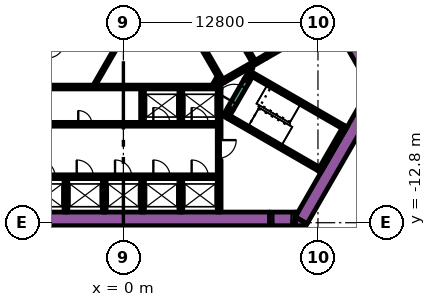
"""IFC4 building model, lengths in metres.
Left out: names, types, materials, properties, quantities, classifications, styles, units other than length and angle.
Written with IfcOpenShell. Run it as: python <this file> out.ifc"""

import sys

from ifc_helpers import new_model, si_unit, direction, frame, frame_2d, origin, place, context, subcontext, project, spatial, polyline, rectangle, outline, extrude, element, fill, save


model = new_model("IFC4")
c1 = context("Model", 3, precision=1e-05, world=origin(), true_north=direction((0.0, 1.0)))
c2 = subcontext(c1, "Body", "Model", "MODEL_VIEW")
j1 = project(units=[si_unit("LENGTHUNIT", "METRE"), si_unit("PLANEANGLEUNIT", "RADIAN")], contexts=[c1])
p1 = place(None, origin())
s1 = spatial("IfcSite", under=j1, at=p1, CompositionType="ELEMENT")
p2 = place(p1, origin())
s2 = spatial("IfcBuilding", under=s1, at=p2, CompositionType="ELEMENT")
p3 = place(p2, origin())
s3 = spatial("IfcBuildingStorey", under=s2, at=p3, CompositionType="ELEMENT", Elevation=0.0)
p4 = place(p3, frame((6.776, 13.364, -1.8), z_axis=(0.0, 0.0, 1.0), x_axis=(0.500004177138, -0.8660229921, 0.0)))
e1 = element("IfcWall", 1, at=p4, inside=s3, PredefinedType="SOLIDWALL", context=c2, shape_type="SweptSolid", body=[
    extrude(rectangle(XDim=20.204, YDim=0.9, at=frame_2d((10.102, 0.0))), origin(), (0.0, 0.0, 1.0), 7.8),
])
p5 = place(p3, frame((11.695, -12.644, -1.8), z_axis=(0.0, 0.0, 1.0), x_axis=(0.500010229568, 0.86601949766, 0.0)))
e2 = element("IfcWall", 2, at=p5, inside=s3, PredefinedType="SOLIDWALL", context=c2, shape_type="SweptSolid", body=[
    extrude(rectangle(XDim=9.326, YDim=0.9, at=frame_2d((4.663, 0.0))), origin(), (0.0, 0.0, 1.0), 7.8),
])
p6 = place(p3, frame((0.0, 0.0, -1.8)))
e3 = element("IfcWall", 3, at=p6, inside=s3, PredefinedType="SOLIDWALL", context=c2, shape_type="SweptSolid", body=[
    extrude(outline(polyline([(12.009, -13.0), (11.312, -13.0), (11.312, -12.425), (12.083, -12.871), (12.009, -13.0)])), origin(), (0.0, 0.0, 1.0), 7.8),
])
e4 = element("IfcWall", 4, at=p6, inside=s3, PredefinedType="SOLIDWALL", context=c2, shape_type="SweptSolid", body=[
    extrude(outline(polyline([(11.489, -12.1), (11.312, -12.407), (11.312, -12.1), (11.489, -12.1)])), origin(), (0.0, 0.0, 1.0), 7.8),
])
p7 = place(p3, frame((-15.36, -1.503, -1.8), z_axis=(0.0, 0.0, 1.0), x_axis=(0.50000389221, 0.866023156604, 0.0)))
e5 = element("IfcWall", 5, at=p7, inside=s3, PredefinedType="SOLIDWALL", context=c2, shape_type="SweptSolid", body=[
    extrude(rectangle(XDim=21.0, YDim=0.9, at=frame_2d((10.5, 0.0))), origin(), (0.0, 0.0, 1.0), 7.8),
])
p8 = place(p3, frame((-12.019, -12.55, -1.8), z_axis=(0.0, 0.0, 1.0), x_axis=(1.0, 0.0, 0.0)))
e6 = element("IfcWall", 6, at=p8, inside=s3, PredefinedType="SOLIDWALL", context=c2, shape_type="SweptSolid", body=[
    extrude(rectangle(XDim=21.63, YDim=0.9, at=frame_2d((10.815, 0.0))), origin(), (0.0, 0.0, 1.0), 7.8),
])
p9 = place(p3, frame((12.885, -9.431, 0.0), z_axis=(0.0, 0.0, 1.0), x_axis=(0.500020560727, 0.866013532718, 0.0)))
e7 = element("IfcWall", 7, at=p9, inside=s3, PredefinedType="SOLIDWALL", context=c2, shape_type="SweptSolid", body=[
    extrude(rectangle(XDim=3.45, YDim=0.25, at=frame_2d((1.725, 0.0))), origin(), (0.0, 0.0, 1.0), 6.0),
])
p10 = place(p3, frame((12.84, -9.261, 0.0), z_axis=(0.0, 0.0, 1.0), x_axis=(-0.866013990052, 0.500019768644, 0.0)))
e8 = element("IfcWall", 8, at=p10, inside=s3, PredefinedType="SOLIDWALL", context=c2, shape_type="SweptSolid", body=[
    extrude(rectangle(XDim=6.8, YDim=0.25, at=frame_2d((3.4, 0.0))), origin(), (0.0, 0.0, 1.0), 6.0),
])
p11 = place(p3, frame((6.78, -5.906, 0.0), z_axis=(0.0, 0.0, 1.0), x_axis=(0.500223362819, 0.865896406789, 0.0)))
e9 = element("IfcWall", 9, at=p11, inside=s3, PredefinedType="SOLIDWALL", context=c2, shape_type="SweptSolid", body=[
    extrude(rectangle(XDim=0.675, YDim=0.25, at=frame_2d((0.337, 0.0))), origin(), (0.0, 0.0, 1.0), 6.0),
])
p12 = place(p3, frame((8.334, -2.964, 0.0), z_axis=(0.0, 0.0, 1.0), x_axis=(0.866016039709, -0.500016218704, 0.0)))
e10 = element("IfcWall", 10, at=p12, inside=s3, PredefinedType="SOLIDWALL", context=c2, shape_type="SweptSolid", body=[
    extrude(rectangle(XDim=7.05, YDim=0.25, at=frame_2d((3.525, 0.0))), origin(), (0.0, 0.0, 1.0), 6.0),
])
p13 = place(p3, frame((8.168, -3.503, 0.0), z_axis=(0.0, 0.0, 1.0), x_axis=(0.49972245349, 0.866185586049, 0.0)))
e11 = element("IfcWall", 11, at=p13, inside=s3, PredefinedType="SOLIDWALL", context=c2, shape_type="SweptSolid", body=[
    extrude(rectangle(XDim=0.425, YDim=0.25, at=frame_2d((0.212, 0.0))), origin(), (0.0, 0.0, 1.0), 6.0),
])
p14 = place(p3, frame((-3.78, -12.1, -1.8), z_axis=(0.0, 0.0, 1.0), x_axis=(0.0, 1.0, 0.0)))
e12 = element("IfcWall", 12, at=p14, inside=s3, PredefinedType="SOLIDWALL", context=c2, shape_type="SweptSolid", body=[
    extrude(rectangle(XDim=2.2, YDim=0.25, at=frame_2d((1.1, 0.0))), origin(), (0.0, 0.0, 1.0), 7.8),
])
p15 = place(p3, frame((-5.845, -3.875, -1.8), z_axis=(0.0, 0.0, 1.0), x_axis=(1.0, 0.0, 0.0)))
e13 = element("IfcWall", 13, at=p15, inside=s3, PredefinedType="SOLIDWALL", context=c2, shape_type="SweptSolid", body=[
    extrude(rectangle(XDim=12.27, YDim=0.25, at=frame_2d((6.135, 0.0))), origin(), (0.0, 0.0, 1.0), 7.8),
])
p16 = place(p3, frame((6.3, -8.67, -1.8), z_axis=(0.0, 0.0, 1.0), x_axis=(0.0, -1.0, 0.0)))
e14 = element("IfcWall", 14, at=p16, inside=s3, PredefinedType="SOLIDWALL", context=c2, shape_type="SweptSolid", body=[
    extrude(rectangle(XDim=3.43, YDim=0.25, at=frame_2d((1.715, 0.0))), origin(), (0.0, 0.0, 1.0), 7.8),
])
p17 = place(p3, frame((6.3, -7.268, -1.8), z_axis=(0.0, 0.0, 1.0), x_axis=(0.0, 1.0, 0.0)))
e15 = element("IfcWall", 15, at=p17, inside=s3, PredefinedType="SOLIDWALL", context=c2, shape_type="SweptSolid", body=[
    extrude(rectangle(XDim=3.268, YDim=0.25, at=frame_2d((1.634, 0.0))), origin(), (0.0, 0.0, 1.0), 7.8),
])
for number, where, z_axis, x_axis in (
    (16, (3.78, -4.0, -1.8), (0.0, 0.0, 1.0), (0.0, -1.0, 0.0)),
    (17, (1.26, -4.0, -1.8), (0.0, 0.0, 1.0), (0.0, -1.0, 0.0)),
    (18, (3.78, -12.1, -1.8), (0.0, 0.0, 1.0), (0.0, 1.0, 0.0)),
    (19, (1.26, -12.1, -1.8), (0.0, 0.0, 1.0), (0.0, 1.0, 0.0)),
    (20, (-1.26, -12.1, -1.8), (0.0, 0.0, 1.0), (0.0, 1.0, 0.0)),
):
    element("IfcWall", number, at=place(p3, frame(where, z_axis=z_axis, x_axis=x_axis)), inside=s3, PredefinedType="SOLIDWALL", context=c2, shape_type="SweptSolid", body=[
        extrude(rectangle(XDim=2.2, YDim=0.25, at=frame_2d((1.1, 0.0))), origin(), (0.0, 0.0, 1.0), 7.8),
    ])
e21 = element("IfcWall", 21, at=p6, inside=s3, PredefinedType="SOLIDWALL", context=c2, shape_type="SweptSolid", body=[
    extrude(outline(polyline([(0.335, 6.925), (0.335, 7.075), (0.335, 7.075), (0.335, 7.075), (0.245, 7.075), (0.079, 7.363), (0.035, 7.439), (0.252, 7.564), (0.377, 7.348), (6.552, -3.348), (6.677, -3.564), (6.46, -3.689), (4.897, -0.981), (0.332, 6.925), (0.335, 6.925), (0.335, 6.925), (0.335, 6.925)])), origin(), (0.0, 0.0, 1.0), 7.8),
])
p18 = place(p3, frame((6.614, -3.456, -1.8), z_axis=(0.0, 0.0, 1.0), x_axis=(0.86602447079, 0.500001615989, 0.0)))
e22 = element("IfcWall", 22, at=p18, inside=s3, PredefinedType="SOLIDWALL", context=c2, shape_type="SweptSolid", body=[
    extrude(rectangle(XDim=3.154, YDim=0.25, at=frame_2d((1.577, 0.0))), origin(), (0.0, 0.0, 1.0), 7.8),
])
p19 = place(p3, frame((6.945, -5.222, 0.0), z_axis=(0.0, 0.0, 1.0), x_axis=(-0.499818422106, -0.866130212453, 0.0)))
e23 = element("IfcWall", 23, at=p19, inside=s3, PredefinedType="PARTITIONING", context=c2, shape_type="SweptSolid", body=[
    extrude(rectangle(XDim=0.514, YDim=0.15, at=frame_2d((0.257, 0.0))), origin(), (0.0, 0.0, 1.0), 5.1),
])
p20 = place(p3, frame((5.936, -3.718, 0.0), z_axis=(0.0, 0.0, 1.0), x_axis=(0.499890179513, 0.866088799389, 0.0)))
e24 = element("IfcWall", 24, at=p20, inside=s3, PredefinedType="PARTITIONING", context=c2, shape_type="SweptSolid", body=[
    extrude(rectangle(XDim=0.504, YDim=0.15, at=frame_2d((0.252, 0.0))), origin(), (0.0, 0.0, 1.0), 5.1),
])
p21 = place(p3, frame((8.459, -2.599, -1.8), z_axis=(0.0, 0.0, 1.0), x_axis=(-0.500041054325, -0.866001699761, 0.0)))
e25 = element("IfcWall", 25, at=p21, inside=s3, PredefinedType="PARTITIONING", context=c2, shape_type="SweptSolid", body=[
    extrude(rectangle(XDim=0.929, YDim=0.15, at=frame_2d((0.464, 0.0))), origin(), (0.0, 0.0, 1.0), 7.8),
])
p22 = place(p3, frame((-1.887, -3.718, 0.0), z_axis=(0.0, 0.0, 1.0), x_axis=(0.500033287521, 0.866006184372, 0.0)))
e26 = element("IfcWall", 26, at=p22, inside=s3, PredefinedType="PARTITIONING", context=c2, shape_type="SweptSolid", body=[
    extrude(rectangle(XDim=3.263, YDim=0.15, at=frame_2d((1.632, 0.0))), origin(), (0.0, 0.0, 1.0), 5.1),
])
p23 = place(p3, frame((-6.175, -9.775, -1.8), z_axis=(0.0, 0.0, 1.0), x_axis=(1.0, 0.0, 0.0)))
e27 = element("IfcWall", 27, at=p23, inside=s3, PredefinedType="SOLIDWALL", context=c2, shape_type="SweptSolid", body=[
    extrude(rectangle(XDim=12.35, YDim=0.25, at=frame_2d((6.175, 0.0))), origin(), (0.0, 0.0, 1.0), 7.8),
])
p24 = place(p23, frame((0.585, 0.0, 1.8)))
e28 = element("IfcOpeningElement", 28, at=p24, cuts=e27, PredefinedType="OPENING", context=c2, shape_type="SweptSolid", body=[
    extrude(rectangle(XDim=1.1, YDim=2.1, at=frame_2d((0.55, 1.05))), frame((0.0, 0.135, 0.0), z_axis=(0.0, -1.0, 0.0), x_axis=(1.0, 0.0, 0.0)), (0.0, 0.0, 1.0), 0.27),
])
p25 = place(p23, frame((3.105, 0.0, 1.8)))
e29 = element("IfcOpeningElement", 29, at=p25, cuts=e27, PredefinedType="OPENING", context=c2, shape_type="SweptSolid", body=[
    extrude(rectangle(XDim=1.1, YDim=2.1, at=frame_2d((0.55, 1.05))), frame((0.0, 0.135, 0.0), z_axis=(0.0, -1.0, 0.0), x_axis=(1.0, 0.0, 0.0)), (0.0, 0.0, 1.0), 0.27),
])
p26 = place(p23, frame((5.625, 0.0, 1.8)))
e30 = element("IfcOpeningElement", 30, at=p26, cuts=e27, PredefinedType="OPENING", context=c2, shape_type="SweptSolid", body=[
    extrude(rectangle(XDim=1.1, YDim=2.1, at=frame_2d((0.55, 1.05))), frame((0.0, 0.135, 0.0), z_axis=(0.0, -1.0, 0.0), x_axis=(1.0, 0.0, 0.0)), (0.0, 0.0, 1.0), 0.27),
])
p27 = place(p23, frame((8.145, 0.0, 1.8)))
e31 = element("IfcOpeningElement", 31, at=p27, cuts=e27, PredefinedType="OPENING", context=c2, shape_type="SweptSolid", body=[
    extrude(rectangle(XDim=1.1, YDim=2.1, at=frame_2d((0.55, 1.05))), frame((0.0, 0.135, 0.0), z_axis=(0.0, -1.0, 0.0), x_axis=(1.0, 0.0, 0.0)), (0.0, 0.0, 1.0), 0.27),
])
p28 = place(p23, frame((10.665, 0.0, 1.8)))
e32 = element("IfcOpeningElement", 32, at=p28, cuts=e27, PredefinedType="OPENING", context=c2, shape_type="SweptSolid", body=[
    extrude(rectangle(XDim=1.1, YDim=2.1, at=frame_2d((0.55, 1.05))), frame((0.0, 0.135, 0.0), z_axis=(0.0, -1.0, 0.0), x_axis=(1.0, 0.0, 0.0)), (0.0, 0.0, 1.0), 0.27),
])
p29 = place(p3, frame((-6.175, -6.325, -1.8), z_axis=(0.0, 0.0, 1.0), x_axis=(1.0, 0.0, 0.0)))
e33 = element("IfcWall", 33, at=p29, inside=s3, PredefinedType="SOLIDWALL", context=c2, shape_type="SweptSolid", body=[
    extrude(rectangle(XDim=12.35, YDim=0.25, at=frame_2d((6.175, 0.0))), origin(), (0.0, 0.0, 1.0), 7.8),
])
p30 = place(p29, frame((3.205, 0.0, 1.8)))
e34 = element("IfcOpeningElement", 34, at=p30, cuts=e33, PredefinedType="OPENING", context=c2, shape_type="SweptSolid", body=[
    extrude(rectangle(XDim=0.9, YDim=2.1, at=frame_2d((0.45, 1.05))), frame((0.0, 0.135, 0.0), z_axis=(0.0, -1.0, 0.0), x_axis=(1.0, 0.0, 0.0)), (0.0, 0.0, 1.0), 0.27),
])
p31 = place(p29, frame((8.145, 0.0, 1.8)))
e35 = element("IfcOpeningElement", 35, at=p31, cuts=e33, PredefinedType="OPENING", context=c2, shape_type="SweptSolid", body=[
    extrude(rectangle(XDim=1.1, YDim=2.1, at=frame_2d((0.55, 1.05))), frame((0.0, 0.135, 0.0), z_axis=(0.0, -1.0, 0.0), x_axis=(1.0, 0.0, 0.0)), (0.0, 0.0, 1.0), 0.27),
])
p32 = place(p29, frame((10.665, 0.0, 1.8)))
e36 = element("IfcOpeningElement", 36, at=p32, cuts=e33, PredefinedType="OPENING", context=c2, shape_type="SweptSolid", body=[
    extrude(rectangle(XDim=1.1, YDim=2.1, at=frame_2d((0.55, 1.05))), frame((0.0, 0.135, 0.0), z_axis=(0.0, -1.0, 0.0), x_axis=(1.0, 0.0, 0.0)), (0.0, 0.0, 1.0), 0.27),
])
p33 = place(p3, frame((8.565, -2.185, -1.8), z_axis=(0.0, 0.0, 1.0), x_axis=(-0.499997954832, 0.866026584559, 0.0)))
e37 = element("IfcWall", 37, at=p33, inside=s3, PredefinedType="SOLIDWALL", context=c2, shape_type="SweptSolid", body=[
    extrude(rectangle(XDim=12.35, YDim=0.25, at=frame_2d((6.175, 0.0))), origin(), (0.0, 0.0, 1.0), 7.8),
])
p34 = place(p33, frame((5.725, 0.0, 1.8)))
e38 = element("IfcOpeningElement", 38, at=p34, cuts=e37, PredefinedType="OPENING", context=c2, shape_type="SweptSolid", body=[
    extrude(rectangle(XDim=0.9, YDim=2.1, at=frame_2d((0.45, 1.05))), frame((0.0, 0.135, 0.0), z_axis=(0.0, -1.0, 0.0), x_axis=(1.0, 0.0, 0.0)), (0.0, 0.0, 1.0), 0.27),
])
p35 = place(p3, frame((-0.898, 6.194, -1.8), z_axis=(0.0, 0.0, 1.0), x_axis=(-0.499996202215, -0.866027596426, 0.0)))
e39 = element("IfcWall", 39, at=p35, inside=s3, PredefinedType="SOLIDWALL", context=c2, shape_type="SweptSolid", body=[
    extrude(rectangle(XDim=9.83, YDim=0.25, at=frame_2d((4.915, 0.0))), origin(), (0.0, 0.0, 1.0), 7.8),
])
p36 = place(p35, frame((0.585, 0.0, 1.8)))
e40 = element("IfcOpeningElement", 40, at=p36, cuts=e39, PredefinedType="OPENING", context=c2, shape_type="SweptSolid", body=[
    extrude(rectangle(XDim=1.1, YDim=2.1, at=frame_2d((0.55, 1.05))), frame((0.0, 0.135, 0.0), z_axis=(0.0, -1.0, 0.0), x_axis=(1.0, 0.0, 0.0)), (0.0, 0.0, 1.0), 0.27),
])
p37 = place(p35, frame((3.105, 0.0, 1.8)))
e41 = element("IfcOpeningElement", 41, at=p37, cuts=e39, PredefinedType="OPENING", context=c2, shape_type="SweptSolid", body=[
    extrude(rectangle(XDim=1.1, YDim=2.1, at=frame_2d((0.55, 1.05))), frame((0.0, 0.135, 0.0), z_axis=(0.0, -1.0, 0.0), x_axis=(1.0, 0.0, 0.0)), (0.0, 0.0, 1.0), 0.27),
])
p38 = place(p35, frame((5.625, 0.0, 1.8)))
e42 = element("IfcOpeningElement", 42, at=p38, cuts=e39, PredefinedType="OPENING", context=c2, shape_type="SweptSolid", body=[
    extrude(rectangle(XDim=1.1, YDim=2.1, at=frame_2d((0.55, 1.05))), frame((0.0, 0.135, 0.0), z_axis=(0.0, -1.0, 0.0), x_axis=(1.0, 0.0, 0.0)), (0.0, 0.0, 1.0), 0.27),
])
p39 = place(p35, frame((8.145, 0.0, 1.8)))
e43 = element("IfcOpeningElement", 43, at=p39, cuts=e39, PredefinedType="OPENING", context=c2, shape_type="SweptSolid", body=[
    extrude(rectangle(XDim=1.1, YDim=2.1, at=frame_2d((0.55, 1.05))), frame((0.0, 0.135, 0.0), z_axis=(0.0, -1.0, 0.0), x_axis=(1.0, 0.0, 0.0)), (0.0, 0.0, 1.0), 0.27),
])
p40 = place(p3, frame((7.053, -5.284, 0.0), z_axis=(0.0, 0.0, 1.0), x_axis=(0.500078061341, 0.865980330357, 0.0)))
e44 = element("IfcWall", 44, at=p40, inside=s3, PredefinedType="SOLIDWALL", context=c2, shape_type="SweptSolid", body=[
    extrude(rectangle(XDim=2.1, YDim=0.4, at=frame_2d((1.05, 0.0))), origin(), (0.0, 0.0, 1.0), 6.0),
])
p41 = place(p40, frame((0.45, 0.0, 0.0)))
e45 = element("IfcOpeningElement", 45, at=p41, cuts=e44, PredefinedType="OPENING", context=c2, shape_type="SweptSolid", body=[
    extrude(rectangle(XDim=1.2, YDim=2.1, at=frame_2d((0.6, 1.05))), frame((0.0, 0.21, 0.0), z_axis=(0.0, -1.0, 0.0), x_axis=(1.0, 0.0, 0.0)), (0.0, 0.0, 1.0), 0.42),
])
p42 = place(p3, frame((9.346, -1.879, -1.8), z_axis=(0.0, 0.0, 1.0), x_axis=(0.866047807691, 0.499961193289, 0.0)))
e46 = element("IfcWall", 46, at=p42, inside=s3, PredefinedType="SOLIDWALL", context=c2, shape_type="SweptSolid", body=[
    extrude(rectangle(XDim=1.8, YDim=0.25, at=frame_2d((0.9, 0.0))), origin(), (0.0, 0.0, 1.0), 7.8),
])
p43 = place(p42, frame((0.45, 0.0, 1.8)))
e47 = element("IfcOpeningElement", 47, at=p43, cuts=e46, PredefinedType="OPENING", context=c2, shape_type="SweptSolid", body=[
    extrude(rectangle(XDim=0.9, YDim=2.1, at=frame_2d((0.45, 1.05))), frame((0.0, 0.135, 0.0), z_axis=(0.0, -1.0, 0.0), x_axis=(1.0, 0.0, 0.0)), (0.0, 0.0, 1.0), 0.27),
])
p44 = place(p3, frame((6.22, -7.266, 0.0), z_axis=(0.0, 0.0, 1.0), x_axis=(0.0, -1.0, 0.0)))
e48 = element("IfcWall", 48, at=p44, inside=s3, PredefinedType="PARTITIONING", context=c2, shape_type="SweptSolid", body=[
    extrude(rectangle(XDim=1.4, YDim=0.09, at=frame_2d((0.7, 0.0))), origin(), (0.0, 0.0, 1.0), 5.1),
])
p45 = place(p44, frame((0.1, 0.0, 0.0)))
e49 = element("IfcOpeningElement", 49, at=p45, cuts=e48, PredefinedType="OPENING", context=c2, shape_type="SweptSolid", body=[
    extrude(rectangle(XDim=1.2, YDim=2.1, at=frame_2d((0.6, 1.05))), frame((0.0, 0.055, 0.0), z_axis=(0.0, -1.0, 0.0), x_axis=(1.0, 0.0, 0.0)), (0.0, 0.0, 1.0), 0.11),
])
p46 = place(p3, frame((11.312, -12.55, -1.8), z_axis=(0.0, 0.0, 1.0), x_axis=(-1.0, 0.0, 0.0)))
e50 = element("IfcWall", 50, at=p46, inside=s3, PredefinedType="SOLIDWALL", context=c2, shape_type="SweptSolid", body=[
    extrude(rectangle(XDim=1.7, YDim=0.9, at=frame_2d((0.85, 0.0))), origin(), (0.0, 0.0, 1.0), 7.8),
])
p47 = place(p46, frame((0.25, 0.0, 1.8)))
e51 = element("IfcOpeningElement", 51, at=p47, cuts=e50, PredefinedType="OPENING", context=c2, shape_type="SweptSolid", body=[
    extrude(rectangle(XDim=1.2, YDim=2.1, at=frame_2d((0.6, 1.05))), frame((0.0, 0.46, 0.0), z_axis=(0.0, -1.0, 0.0), x_axis=(1.0, 0.0, 0.0)), (0.0, 0.0, 1.0), 0.92),
])
p48 = place(p24, origin())
e52 = element("IfcDoor", 52, at=p48, inside=s3, OperationType="DOUBLE_DOOR_SLIDING", PredefinedType="DOOR", context=c2, shape_type="SweptSolid", body=[
    extrude(rectangle(XDim=1.1, YDim=2.1, at=frame_2d((0.55, 1.05))), frame((0.0, 0.025, 0.0), z_axis=(0.0, -1.0, 0.0), x_axis=(1.0, 0.0, 0.0)), (0.0, 0.0, 1.0), 0.05),
])
fill(e28, e52)
p49 = place(p25, origin())
e53 = element("IfcDoor", 53, at=p49, inside=s3, OperationType="DOUBLE_DOOR_SLIDING", PredefinedType="DOOR", context=c2, shape_type="SweptSolid", body=[
    extrude(rectangle(XDim=1.1, YDim=2.1, at=frame_2d((0.55, 1.05))), frame((0.0, 0.025, 0.0), z_axis=(0.0, -1.0, 0.0), x_axis=(1.0, 0.0, 0.0)), (0.0, 0.0, 1.0), 0.05),
])
fill(e29, e53)
p50 = place(p26, origin())
e54 = element("IfcDoor", 54, at=p50, inside=s3, OperationType="DOUBLE_DOOR_SLIDING", PredefinedType="DOOR", context=c2, shape_type="SweptSolid", body=[
    extrude(rectangle(XDim=1.1, YDim=2.1, at=frame_2d((0.55, 1.05))), frame((0.0, 0.025, 0.0), z_axis=(0.0, -1.0, 0.0), x_axis=(1.0, 0.0, 0.0)), (0.0, 0.0, 1.0), 0.05),
])
fill(e30, e54)
p51 = place(p27, origin())
e55 = element("IfcDoor", 55, at=p51, inside=s3, OperationType="DOUBLE_DOOR_SLIDING", PredefinedType="DOOR", context=c2, shape_type="SweptSolid", body=[
    extrude(rectangle(XDim=1.1, YDim=2.1, at=frame_2d((0.55, 1.05))), frame((0.0, 0.025, 0.0), z_axis=(0.0, -1.0, 0.0), x_axis=(1.0, 0.0, 0.0)), (0.0, 0.0, 1.0), 0.05),
])
fill(e31, e55)
p52 = place(p28, origin())
e56 = element("IfcDoor", 56, at=p52, inside=s3, OperationType="DOUBLE_DOOR_SLIDING", PredefinedType="DOOR", context=c2, shape_type="SweptSolid", body=[
    extrude(rectangle(XDim=1.1, YDim=2.1, at=frame_2d((0.55, 1.05))), frame((0.0, 0.025, 0.0), z_axis=(0.0, -1.0, 0.0), x_axis=(1.0, 0.0, 0.0)), (0.0, 0.0, 1.0), 0.05),
])
fill(e32, e56)
p53 = place(p30, origin())
e57 = element("IfcDoor", 57, at=p53, inside=s3, OperationType="SINGLE_SWING_LEFT", PredefinedType="DOOR", context=c2, shape_type="SweptSolid", body=[
    extrude(rectangle(XDim=0.9, YDim=2.1, at=frame_2d((0.45, 1.05))), frame((0.0, 0.025, 0.0), z_axis=(0.0, -1.0, 0.0), x_axis=(1.0, 0.0, 0.0)), (0.0, 0.0, 1.0), 0.05),
])
fill(e34, e57)
p54 = place(p31, origin())
e58 = element("IfcDoor", 58, at=p54, inside=s3, OperationType="DOUBLE_DOOR_SLIDING", PredefinedType="DOOR", context=c2, shape_type="SweptSolid", body=[
    extrude(rectangle(XDim=1.1, YDim=2.1, at=frame_2d((0.55, 1.05))), frame((0.0, 0.025, 0.0), z_axis=(0.0, -1.0, 0.0), x_axis=(1.0, 0.0, 0.0)), (0.0, 0.0, 1.0), 0.05),
])
fill(e35, e58)
p55 = place(p32, origin())
e59 = element("IfcDoor", 59, at=p55, inside=s3, OperationType="DOUBLE_DOOR_SLIDING", PredefinedType="DOOR", context=c2, shape_type="SweptSolid", body=[
    extrude(rectangle(XDim=1.1, YDim=2.1, at=frame_2d((0.55, 1.05))), frame((0.0, 0.025, 0.0), z_axis=(0.0, -1.0, 0.0), x_axis=(1.0, 0.0, 0.0)), (0.0, 0.0, 1.0), 0.05),
])
fill(e36, e59)
p56 = place(p41, origin())
e60 = element("IfcDoor", 60, at=p56, inside=s3, OperationType="SINGLE_SWING_LEFT", PredefinedType="DOOR", context=c2, shape_type="SweptSolid", body=[
    extrude(rectangle(XDim=1.2, YDim=2.1, at=frame_2d((0.6, 1.05))), frame((0.0, 0.025, 0.0), z_axis=(0.0, -1.0, 0.0), x_axis=(1.0, 0.0, 0.0)), (0.0, 0.0, 1.0), 0.05),
])
fill(e45, e60)
p57 = place(p43, origin())
e61 = element("IfcDoor", 61, at=p57, inside=s3, OperationType="SINGLE_SWING_LEFT", PredefinedType="DOOR", context=c2, shape_type="SweptSolid", body=[
    extrude(rectangle(XDim=0.9, YDim=2.1, at=frame_2d((0.45, 1.05))), frame((0.0, 0.025, 0.0), z_axis=(0.0, -1.0, 0.0), x_axis=(1.0, 0.0, 0.0)), (0.0, 0.0, 1.0), 0.05),
])
fill(e47, e61)
p58 = place(p45, origin())
e62 = element("IfcDoor", 62, at=p58, inside=s3, OperationType="SINGLE_SWING_LEFT", PredefinedType="DOOR", context=c2, shape_type="SweptSolid", body=[
    extrude(rectangle(XDim=1.2, YDim=2.1, at=frame_2d((0.6, 1.05))), frame((0.0, 0.025, 0.0), z_axis=(0.0, -1.0, 0.0), x_axis=(1.0, 0.0, 0.0)), (0.0, 0.0, 1.0), 0.05),
])
fill(e49, e62)
p59 = place(p47, origin())
e63 = element("IfcDoor", 63, at=p59, inside=s3, OperationType="SINGLE_SWING_LEFT", PredefinedType="DOOR", context=c2, shape_type="SweptSolid", body=[
    extrude(rectangle(XDim=1.2, YDim=2.1, at=frame_2d((0.6, 1.05))), frame((0.0, 0.025, 0.0), z_axis=(0.0, -1.0, 0.0), x_axis=(1.0, 0.0, 0.0)), (0.0, 0.0, 1.0), 0.05),
])
fill(e51, e63)
save(model, sys.argv[1])
